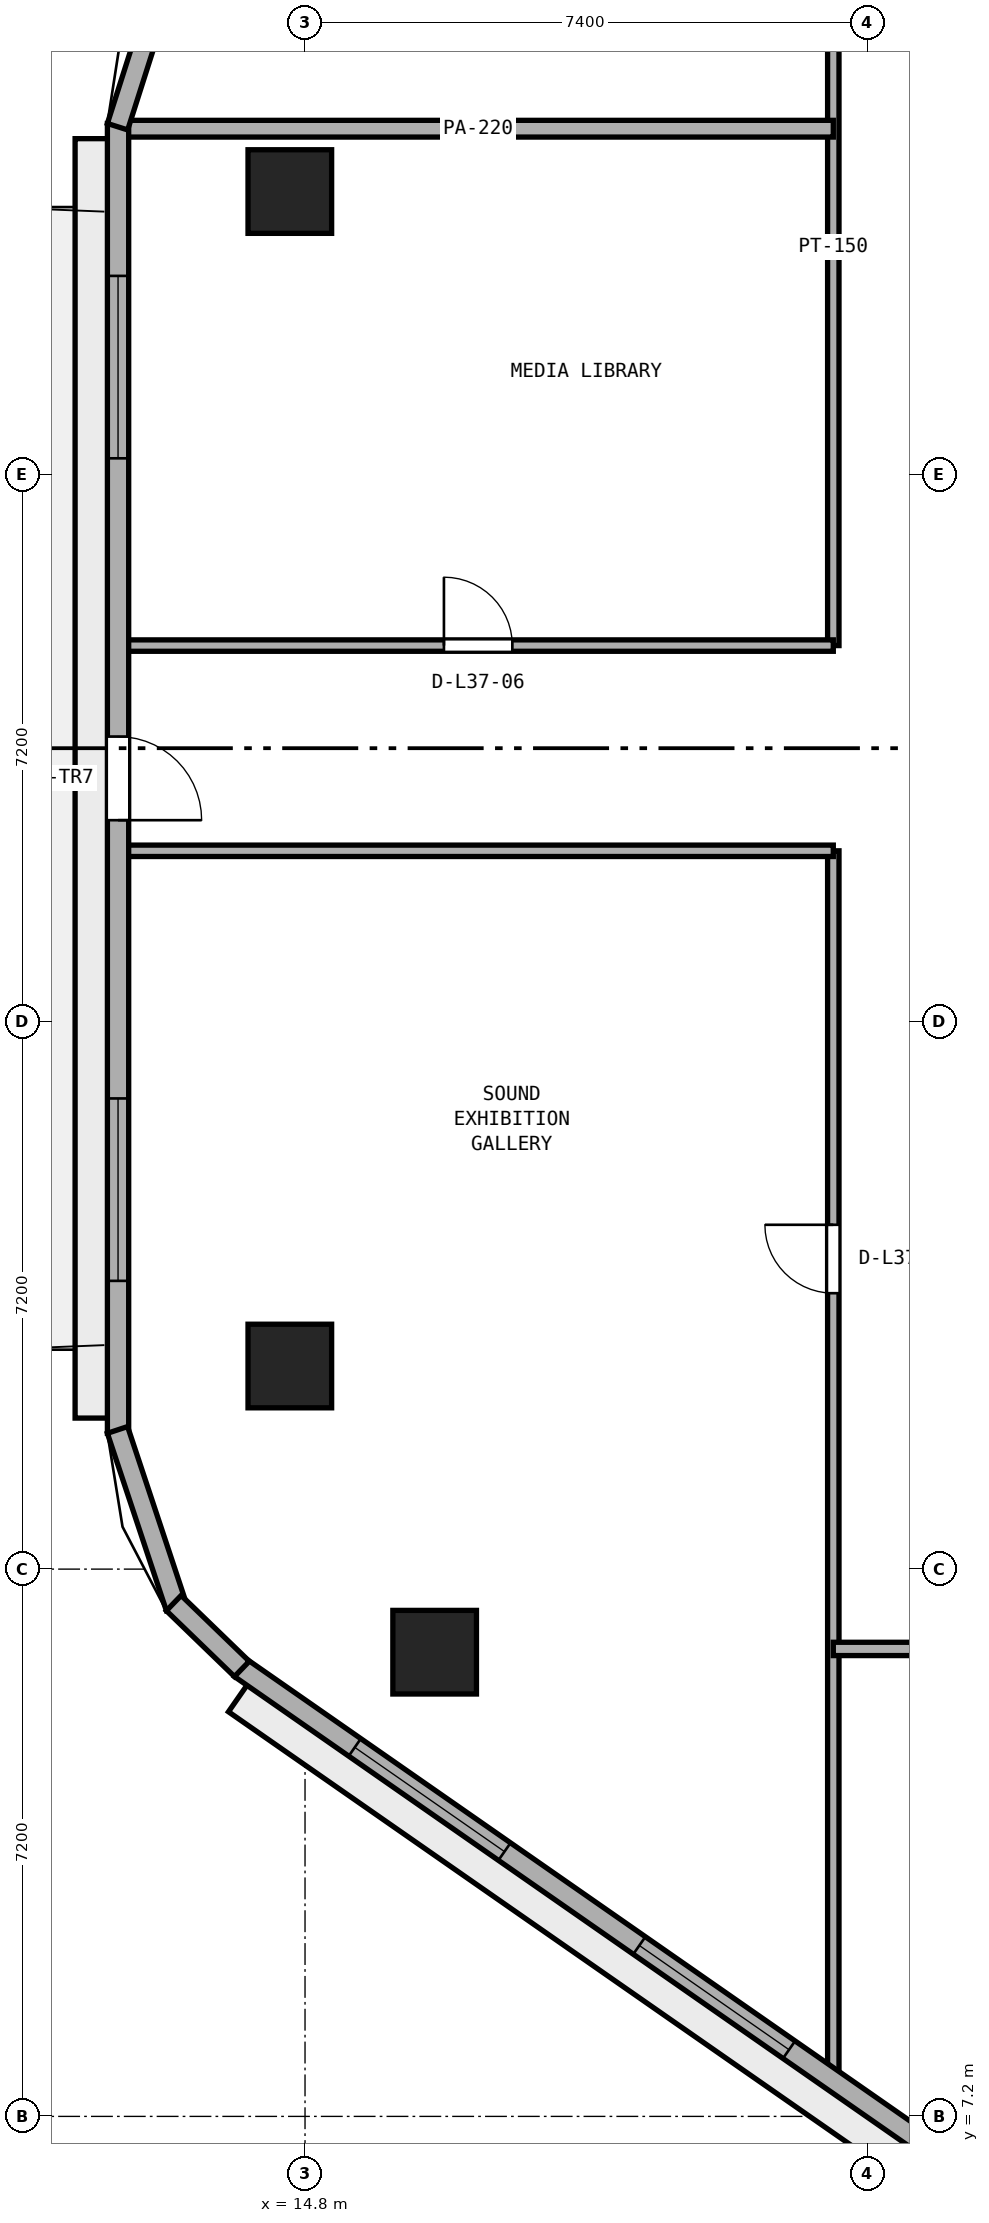
"""IFC4 building model, lengths in metres.
Left out: names, types, materials, properties, quantities, classifications, styles, units other than length and angle.
Written with IfcOpenShell. Run it as: python <this file> out.ifc"""

import sys

from ifc_helpers import new_model, si_unit, direction, frame, frame_2d, origin, origin_2d, place, context, subcontext, project, spatial, rectangle, extrude, element, fill, save


model = new_model("IFC4")
c1 = context("Model", 3, precision=1e-05, world=origin(), true_north=direction((0.0, 1.0)))
c2 = subcontext(c1, "Body", "Model", "MODEL_VIEW")
j1 = project(units=[si_unit("LENGTHUNIT", "METRE"), si_unit("PLANEANGLEUNIT", "RADIAN")], contexts=[c1])
p1 = place(None, origin())
s1 = spatial("IfcSite", under=j1, at=p1, CompositionType="ELEMENT")
p2 = place(p1, origin())
s2 = spatial("IfcBuilding", under=s1, at=p2, CompositionType="ELEMENT")
p3 = place(p2, frame((0.0, 0.0, 147.8)))
s3 = spatial("IfcBuildingStorey", under=s2, at=p3, CompositionType="ELEMENT", Elevation=147.8)
for number, where, z_axis, x_axis in (
    (1, (14.6, 32.523, 0.0), (0.0, 0.0, 1.0), (1.0, 0.0, 0.0)),
    (2, (14.6, 17.072, 0.0), (0.0, 0.0, 1.0), (1.0, 0.0, 0.0)),
    (3, (16.505, 13.307, 0.0), (0.0, 0.0, 1.0), (1.0, 0.0, 0.0)),
):
    element("IfcColumn", number, at=place(p3, frame(where, z_axis=z_axis, x_axis=x_axis)), inside=s3, PredefinedType="COLUMN", context=c2, shape_type="SweptSolid", body=[
        extrude(rectangle(XDim=1.1, YDim=1.1, at=origin_2d()), origin(), (0.0, 0.0, 1.0), 3.8),
    ])
p4 = place(p3, frame((21.75, 7.641, 0.0), z_axis=(0.0, 0.0, 1.0), x_axis=(0.0, 1.0, 0.0)))
e4 = element("IfcWall", 4, at=p4, inside=s3, PredefinedType="PARTITIONING", context=c2, shape_type="SweptSolid", body=[
    extrude(rectangle(XDim=16.209, YDim=0.15, at=frame_2d((8.104, 0.0))), origin(), (0.0, 0.0, 1.0), 3.54),
])
p5 = place(p4, frame((10.389, 0.0, 0.0)))
e5 = element("IfcOpeningElement", 5, at=p5, cuts=e4, PredefinedType="OPENING", context=c2, shape_type="SweptSolid", body=[
    extrude(rectangle(XDim=0.9, YDim=2.1, at=frame_2d((0.45, 1.05))), frame((0.0, 0.085, 0.0), z_axis=(0.0, -1.0, 0.0), x_axis=(1.0, 0.0, 0.0)), (0.0, 0.0, 1.0), 0.17),
])
p6 = place(p3, frame((21.75, 26.55, 0.0), z_axis=(0.0, 0.0, 1.0), x_axis=(0.0, 1.0, 0.0)))
e6 = element("IfcWall", 6, at=p6, inside=s3, PredefinedType="PARTITIONING", context=c2, shape_type="SweptSolid", body=[
    extrude(rectangle(XDim=10.5, YDim=0.15, at=frame_2d((5.25, 0.0))), origin(), (0.0, 0.0, 1.0), 3.54),
])
p7 = place(p3, frame((21.75, 13.35, 0.0), z_axis=(0.0, 0.0, 1.0), x_axis=(1.0, 0.0, 0.0)))
e7 = element("IfcWall", 7, at=p7, inside=s3, PredefinedType="PARTITIONING", context=c2, shape_type="SweptSolid", body=[
    extrude(rectangle(XDim=12.65, YDim=0.175, at=frame_2d((6.325, 0.0))), origin(), (0.0, 0.0, 1.0), 3.54),
])
p8 = place(p7, frame((3.895, 0.0, 0.0)))
e8 = element("IfcOpeningElement", 8, at=p8, cuts=e7, PredefinedType="OPENING", context=c2, shape_type="SweptSolid", body=[
    extrude(rectangle(XDim=0.9, YDim=2.1, at=frame_2d((0.45, 1.05))), frame((0.0, 0.097, 0.0), z_axis=(0.0, -1.0, 0.0), x_axis=(1.0, 0.0, 0.0)), (0.0, 0.0, 1.0), 0.195),
])
p9 = place(p7, frame((9.98, 0.0, 0.0)))
e9 = element("IfcOpeningElement", 9, at=p9, cuts=e7, PredefinedType="OPENING", context=c2, shape_type="SweptSolid", body=[
    extrude(rectangle(XDim=0.9, YDim=2.1, at=frame_2d((0.45, 1.05))), frame((0.0, 0.097, 0.0), z_axis=(0.0, -1.0, 0.0), x_axis=(1.0, 0.0, 0.0)), (0.0, 0.0, 1.0), 0.195),
])
p10 = place(p3, frame((12.405, 23.85, 0.0), z_axis=(0.0, 0.0, 1.0), x_axis=(1.0, 0.0, 0.0)))
e10 = element("IfcWall", 10, at=p10, inside=s3, PredefinedType="PARTITIONING", context=c2, shape_type="SweptSolid", body=[
    extrude(rectangle(XDim=9.345, YDim=0.15, at=frame_2d((4.672, 0.0))), origin(), (0.0, 0.0, 1.0), 3.54),
])
p11 = place(p3, frame((12.405, 26.55, 0.0), z_axis=(0.0, 0.0, 1.0), x_axis=(1.0, 0.0, 0.0)))
e11 = element("IfcWall", 11, at=p11, inside=s3, PredefinedType="PARTITIONING", context=c2, shape_type="SweptSolid", body=[
    extrude(rectangle(XDim=9.345, YDim=0.15, at=frame_2d((4.672, 0.0))), origin(), (0.0, 0.0, 1.0), 3.54),
])
p12 = place(p11, frame((4.222, 0.0, 0.0)))
e12 = element("IfcOpeningElement", 12, at=p12, cuts=e11, PredefinedType="OPENING", context=c2, shape_type="SweptSolid", body=[
    extrude(rectangle(XDim=0.9, YDim=2.1, at=frame_2d((0.45, 1.05))), frame((0.0, 0.085, 0.0), z_axis=(0.0, -1.0, 0.0), x_axis=(1.0, 0.0, 0.0)), (0.0, 0.0, 1.0), 0.17),
])
p13 = place(p3, frame((12.405, 33.35, 0.0), z_axis=(0.0, 0.0, 1.0), x_axis=(1.0, 0.0, 0.0)))
e13 = element("IfcWall", 13, at=p13, inside=s3, PredefinedType="PARTITIONING", context=c2, shape_type="SweptSolid", body=[
    extrude(rectangle(XDim=9.345, YDim=0.22, at=frame_2d((4.672, 0.0))), origin(), (0.0, 0.0, 1.0), 3.54),
])
p14 = place(p3, frame((12.34, 33.419, 0.0), z_axis=(0.0, 0.0, 1.0), x_axis=(0.0, -1.0, 0.0)))
e14 = element("IfcWall", 14, at=p14, inside=s3, PredefinedType="STANDARD", context=c2, shape_type="SweptSolid", body=[
    extrude(rectangle(XDim=17.232, YDim=0.28, at=frame_2d((8.616, 0.0))), origin(), (0.0, 0.0, 1.0), 3.54),
])
p15 = place(p14, frame((8.066, 0.0, 0.0)))
e15 = element("IfcOpeningElement", 15, at=p15, cuts=e14, PredefinedType="OPENING", context=c2, shape_type="SweptSolid", body=[
    extrude(rectangle(XDim=1.1, YDim=2.2, at=frame_2d((0.55, 1.1))), frame((0.0, 0.15, 0.0), z_axis=(0.0, -1.0, 0.0), x_axis=(1.0, 0.0, 0.0)), (0.0, 0.0, 1.0), 0.3),
])
p16 = place(p14, frame((2.005, 0.0, 0.9)))
e16 = element("IfcOpeningElement", 16, at=p16, cuts=e14, PredefinedType="OPENING", context=c2, shape_type="SweptSolid", body=[
    extrude(rectangle(XDim=2.4, YDim=1.75, at=frame_2d((1.2, 0.875))), frame((0.0, 0.15, 0.0), z_axis=(0.0, -1.0, 0.0), x_axis=(1.0, 0.0, 0.0)), (0.0, 0.0, 1.0), 0.3),
])
p17 = place(p14, frame((12.827, 0.0, 0.9)))
e17 = element("IfcOpeningElement", 17, at=p17, cuts=e14, PredefinedType="OPENING", context=c2, shape_type="SweptSolid", body=[
    extrude(rectangle(XDim=2.4, YDim=1.75, at=frame_2d((1.2, 0.875))), frame((0.0, 0.15, 0.0), z_axis=(0.0, -1.0, 0.0), x_axis=(1.0, 0.0, 0.0)), (0.0, 0.0, 1.0), 0.3),
])
p18 = place(p3, frame((13.952, 13.101, 0.0), z_axis=(0.0, 0.0, 1.0), x_axis=(0.820698239491, -0.571361881558, 0.0)))
e18 = element("IfcWall", 18, at=p18, inside=s3, PredefinedType="STANDARD", context=c2, shape_type="SweptSolid", body=[
    extrude(rectangle(XDim=16.186, YDim=0.28, at=frame_2d((8.093, 0.0))), origin(), (0.0, 0.0, 1.0), 3.54),
])
p19 = place(p18, frame((1.831, 0.0, 0.9)))
e19 = element("IfcOpeningElement", 19, at=p19, cuts=e18, PredefinedType="OPENING", context=c2, shape_type="SweptSolid", body=[
    extrude(rectangle(XDim=2.4, YDim=1.75, at=frame_2d((1.2, 0.875))), frame((0.0, 0.15, 0.0), z_axis=(0.0, -1.0, 0.0), x_axis=(1.0, 0.0, 0.0)), (0.0, 0.0, 1.0), 0.3),
])
p20 = place(p18, frame((6.393, 0.0, 0.9)))
e20 = element("IfcOpeningElement", 20, at=p20, cuts=e18, PredefinedType="OPENING", context=c2, shape_type="SweptSolid", body=[
    extrude(rectangle(XDim=2.4, YDim=1.75, at=frame_2d((1.2, 0.875))), frame((0.0, 0.15, 0.0), z_axis=(0.0, -1.0, 0.0), x_axis=(1.0, 0.0, 0.0)), (0.0, 0.0, 1.0), 0.3),
])
p21 = place(p18, frame((11.955, 0.0, 0.9)))
e21 = element("IfcOpeningElement", 21, at=p21, cuts=e18, PredefinedType="OPENING", context=c2, shape_type="SweptSolid", body=[
    extrude(rectangle(XDim=2.4, YDim=1.75, at=frame_2d((1.2, 0.875))), frame((0.0, 0.15, 0.0), z_axis=(0.0, -1.0, 0.0), x_axis=(1.0, 0.0, 0.0)), (0.0, 0.0, 1.0), 0.3),
])
p22 = place(p3, frame((13.053, 35.634, 0.0), z_axis=(0.0, 0.0, 1.0), x_axis=(-0.303807416298, -0.952733464198, 0.0)))
e22 = element("IfcWall", 22, at=p22, inside=s3, PredefinedType="STANDARD", context=c2, shape_type="SweptSolid", body=[
    extrude(rectangle(XDim=2.37, YDim=0.28, at=frame_2d((1.185, 0.0))), origin(), (0.0, 0.0, 1.0), 3.54),
])
p23 = place(p3, frame((12.333, 16.231, 0.0), z_axis=(0.0, 0.0, 1.0), x_axis=(0.315364302967, -0.94897068259, 0.0)))
e23 = element("IfcWall", 23, at=p23, inside=s3, PredefinedType="STANDARD", context=c2, shape_type="SweptSolid", body=[
    extrude(rectangle(XDim=2.46, YDim=0.28, at=frame_2d((1.23, 0.0))), origin(), (0.0, 0.0, 1.0), 3.54),
])
p24 = place(p3, frame((13.073, 13.953, 0.0), z_axis=(0.0, 0.0, 1.0), x_axis=(0.718958999036, -0.695052485576, 0.0)))
e24 = element("IfcWall", 24, at=p24, inside=s3, PredefinedType="STANDARD", context=c2, shape_type="SweptSolid", body=[
    extrude(rectangle(XDim=1.246, YDim=0.28, at=frame_2d((0.623, 0.0))), origin(), (0.0, 0.0, 1.0), 3.54),
])
p25 = place(p5, origin())
e25 = element("IfcDoor", 25, at=p25, inside=s3, OperationType="SINGLE_SWING_RIGHT", PredefinedType="DOOR", context=c2, shape_type="SweptSolid", body=[
    extrude(rectangle(XDim=0.9, YDim=2.1, at=frame_2d((0.45, 1.05))), frame((0.0, 0.025, 0.0), z_axis=(0.0, -1.0, 0.0), x_axis=(1.0, 0.0, 0.0)), (0.0, 0.0, 1.0), 0.05),
])
fill(e5, e25)
p26 = place(p12, origin())
e26 = element("IfcDoor", 26, at=p26, inside=s3, OperationType="SINGLE_SWING_LEFT", PredefinedType="DOOR", context=c2, shape_type="SweptSolid", body=[
    extrude(rectangle(XDim=0.9, YDim=2.1, at=frame_2d((0.45, 1.05))), frame((0.0, 0.025, 0.0), z_axis=(0.0, -1.0, 0.0), x_axis=(1.0, 0.0, 0.0)), (0.0, 0.0, 1.0), 0.05),
])
fill(e12, e26)
p27 = place(p15, origin())
e27 = element("IfcDoor", 27, at=p27, inside=s3, OperationType="SINGLE_SWING_RIGHT", PredefinedType="DOOR", context=c2, shape_type="SweptSolid", body=[
    extrude(rectangle(XDim=1.1, YDim=2.2, at=frame_2d((0.55, 1.1))), frame((0.0, 0.025, 0.0), z_axis=(0.0, -1.0, 0.0), x_axis=(1.0, 0.0, 0.0)), (0.0, 0.0, 1.0), 0.05),
])
fill(e15, e27)
p28 = place(p16, origin())
e28 = element("IfcWindow", 28, at=p28, inside=s3, PartitioningType="SINGLE_PANEL", PredefinedType="WINDOW", context=c2, shape_type="SweptSolid", body=[
    extrude(rectangle(XDim=2.4, YDim=1.75, at=frame_2d((1.2, 0.875))), frame((0.0, 0.03, 0.0), z_axis=(0.0, -1.0, 0.0), x_axis=(1.0, 0.0, 0.0)), (0.0, 0.0, 1.0), 0.06),
])
fill(e16, e28)
p29 = place(p17, origin())
e29 = element("IfcWindow", 29, at=p29, inside=s3, PartitioningType="SINGLE_PANEL", PredefinedType="WINDOW", context=c2, shape_type="SweptSolid", body=[
    extrude(rectangle(XDim=2.4, YDim=1.75, at=frame_2d((1.2, 0.875))), frame((0.0, 0.03, 0.0), z_axis=(0.0, -1.0, 0.0), x_axis=(1.0, 0.0, 0.0)), (0.0, 0.0, 1.0), 0.06),
])
fill(e17, e29)
p30 = place(p19, origin())
e30 = element("IfcWindow", 30, at=p30, inside=s3, PartitioningType="SINGLE_PANEL", PredefinedType="WINDOW", context=c2, shape_type="SweptSolid", body=[
    extrude(rectangle(XDim=2.4, YDim=1.75, at=frame_2d((1.2, 0.875))), frame((0.0, 0.03, 0.0), z_axis=(0.0, -1.0, 0.0), x_axis=(1.0, 0.0, 0.0)), (0.0, 0.0, 1.0), 0.06),
])
fill(e19, e30)
p31 = place(p20, origin())
e31 = element("IfcWindow", 31, at=p31, inside=s3, PartitioningType="SINGLE_PANEL", PredefinedType="WINDOW", context=c2, shape_type="SweptSolid", body=[
    extrude(rectangle(XDim=2.4, YDim=1.75, at=frame_2d((1.2, 0.875))), frame((0.0, 0.03, 0.0), z_axis=(0.0, -1.0, 0.0), x_axis=(1.0, 0.0, 0.0)), (0.0, 0.0, 1.0), 0.06),
])
fill(e20, e31)
save(model, sys.argv[1])
